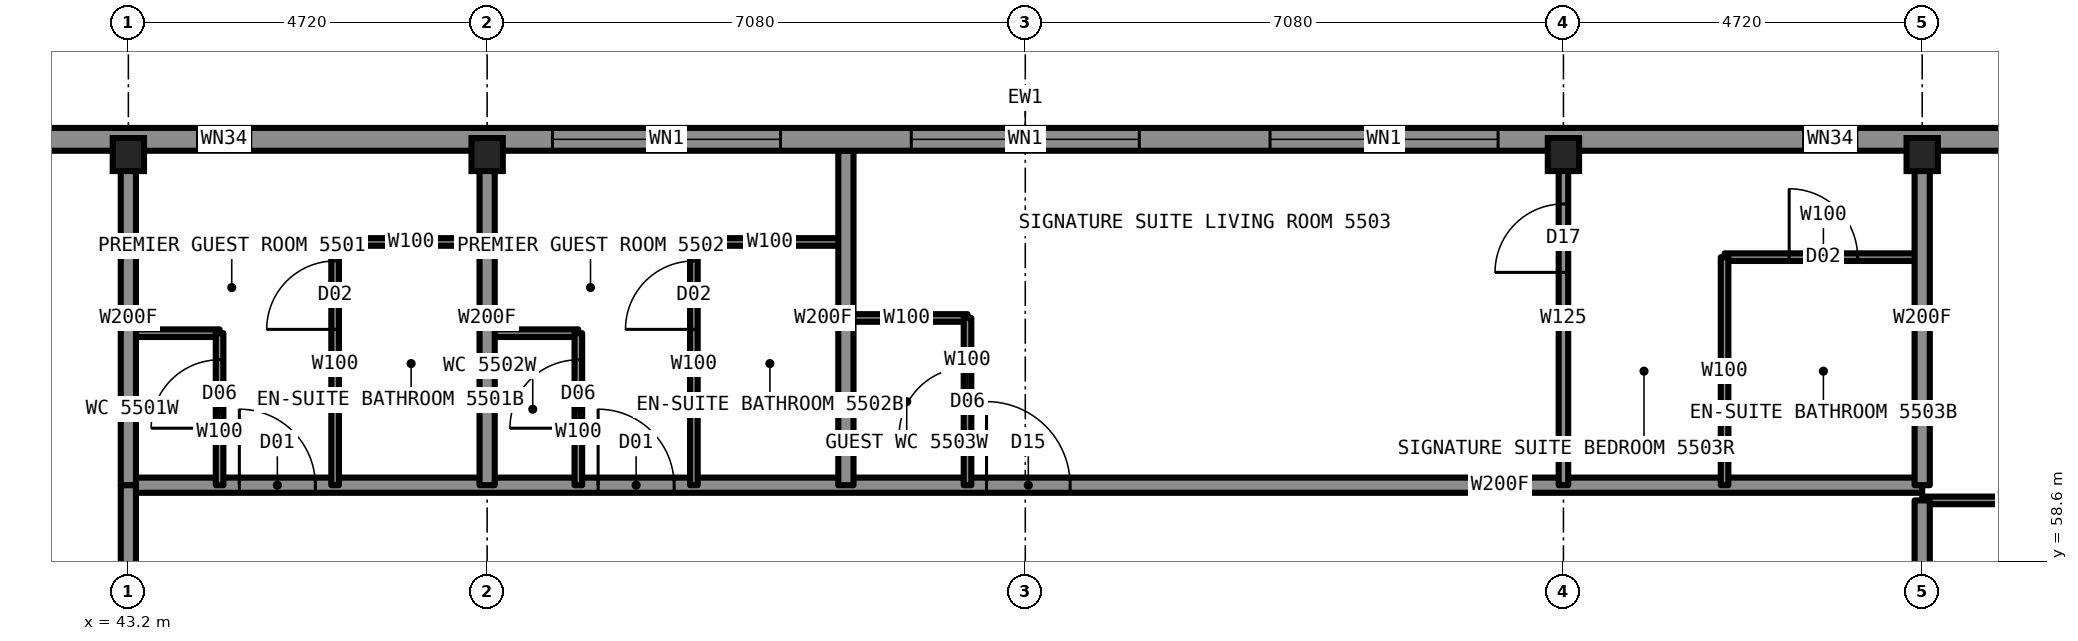
"""IFC4 building model, lengths in metres.
Left out: names, types, materials, properties, quantities, classifications, styles, units other than length and angle.
Written with IfcOpenShell. Run it as: python <this file> out.ifc"""

import sys

from ifc_helpers import new_model, si_unit, direction, frame, frame_2d, origin, origin_2d, place, context, subcontext, project, spatial, rectangle, i_section, extrude, element, fill, save


model = new_model("IFC4")
c1 = context("Model", 3, precision=1e-05, world=origin(), true_north=direction((0.0, 1.0)))
c2 = subcontext(c1, "Body", "Model", "MODEL_VIEW")
j1 = project(units=[si_unit("LENGTHUNIT", "METRE"), si_unit("PLANEANGLEUNIT", "RADIAN")], contexts=[c1])
p1 = place(None, origin())
s1 = spatial("IfcSite", under=j1, at=p1, CompositionType="ELEMENT")
p2 = place(p1, origin())
s2 = spatial("IfcBuilding", under=s1, at=p2, CompositionType="ELEMENT")
p3 = place(p2, frame((0.0, 0.0, 203.8)))
s3 = spatial("IfcBuildingStorey", under=s2, at=p3, CompositionType="ELEMENT", Elevation=203.8)
for number, where, z_axis, x_axis in (
    (1, (43.2, 63.95, 0.0), (0.0, 0.0, 1.0), (1.0, 0.0, 0.0)),
    (2, (47.92, 63.95, 0.0), (0.0, 0.0, 1.0), (1.0, 0.0, 0.0)),
    (3, (62.08, 63.95, 0.0), (0.0, 0.0, 1.0), (1.0, 0.0, 0.0)),
    (4, (66.8, 63.95, 0.0), (0.0, 0.0, 1.0), (1.0, 0.0, 0.0)),
):
    element("IfcColumn", number, at=place(p3, frame(where, z_axis=z_axis, x_axis=x_axis)), inside=s3, PredefinedType="COLUMN", context=c2, shape_type="SweptSolid", body=[
        extrude(i_section(OverallWidth=0.411, OverallDepth=0.434, WebThickness=0.036, FlangeThickness=0.057, at=origin_2d()), origin(), (0.0, 0.0, 1.0), 3.5),
    ])
p4 = place(p3, frame((66.8, 59.4, 0.0), z_axis=(0.0, 0.0, 1.0), x_axis=(1.0, 0.0, 0.0)))
e5 = element("IfcWall", 5, at=p4, inside=s3, PredefinedType="PARTITIONING", context=c2, shape_type="SweptSolid", body=[
    extrude(rectangle(XDim=2.6, YDim=0.1, at=frame_2d((1.3, 0.0))), origin(), (0.0, 0.0, 1.0), 3.33),
])
p5 = place(p3, frame((43.2, 59.6, 0.0), z_axis=(0.0, 0.0, 1.0), x_axis=(1.0, 0.0, 0.0)))
e6 = element("IfcWall", 6, at=p5, inside=s3, PredefinedType="PARTITIONING", context=c2, shape_type="SweptSolid", body=[
    extrude(rectangle(XDim=23.6, YDim=0.2, at=frame_2d((11.8, 0.0))), origin(), (0.0, 0.0, 1.0), 3.33),
])
p6 = place(p5, frame((1.46, 0.0, 0.0)))
e7 = element("IfcOpeningElement", 7, at=p6, cuts=e6, PredefinedType="OPENING", context=c2, shape_type="SweptSolid", body=[
    extrude(rectangle(XDim=1.0, YDim=2.2, at=frame_2d((0.5, 1.1))), frame((0.0, 0.11, 0.0), z_axis=(0.0, -1.0, 0.0), x_axis=(1.0, 0.0, 0.0)), (0.0, 0.0, 1.0), 0.22),
])
p7 = place(p5, frame((6.18, 0.0, 0.0)))
e8 = element("IfcOpeningElement", 8, at=p7, cuts=e6, PredefinedType="OPENING", context=c2, shape_type="SweptSolid", body=[
    extrude(rectangle(XDim=1.0, YDim=2.2, at=frame_2d((0.5, 1.1))), frame((0.0, 0.11, 0.0), z_axis=(0.0, -1.0, 0.0), x_axis=(1.0, 0.0, 0.0)), (0.0, 0.0, 1.0), 0.22),
])
p8 = place(p5, frame((11.29, 0.0, 0.0)))
e9 = element("IfcOpeningElement", 9, at=p8, cuts=e6, PredefinedType="OPENING", context=c2, shape_type="SweptSolid", body=[
    extrude(rectangle(XDim=1.1, YDim=2.2, at=frame_2d((0.55, 1.1))), frame((0.0, 0.11, 0.0), z_axis=(0.0, -1.0, 0.0), x_axis=(1.0, 0.0, 0.0)), (0.0, 0.0, 1.0), 0.22),
])
p9 = place(p3, frame((43.2, 61.6, 0.0), z_axis=(0.0, 0.0, 1.0), x_axis=(1.0, 0.0, 0.0)))
e10 = element("IfcWall", 10, at=p9, inside=s3, PredefinedType="PARTITIONING", context=c2, shape_type="SweptSolid", body=[
    extrude(rectangle(XDim=1.2, YDim=0.1, at=frame_2d((0.6, 0.0))), origin(), (0.0, 0.0, 1.0), 3.33),
])
p10 = place(p3, frame((47.92, 61.6, 0.0), z_axis=(0.0, 0.0, 1.0), x_axis=(1.0, 0.0, 0.0)))
e11 = element("IfcWall", 11, at=p10, inside=s3, PredefinedType="PARTITIONING", context=c2, shape_type="SweptSolid", body=[
    extrude(rectangle(XDim=1.2, YDim=0.1, at=frame_2d((0.6, 0.0))), origin(), (0.0, 0.0, 1.0), 3.33),
])
p11 = place(p3, frame((52.64, 61.8, 0.0), z_axis=(0.0, 0.0, 1.0), x_axis=(1.0, 0.0, 0.0)))
e12 = element("IfcWall", 12, at=p11, inside=s3, PredefinedType="PARTITIONING", context=c2, shape_type="SweptSolid", body=[
    extrude(rectangle(XDim=1.6, YDim=0.1, at=frame_2d((0.8, 0.0))), origin(), (0.0, 0.0, 1.0), 3.33),
])
p12 = place(p3, frame((64.2, 62.6, 0.0), z_axis=(0.0, 0.0, 1.0), x_axis=(1.0, 0.0, 0.0)))
e13 = element("IfcWall", 13, at=p12, inside=s3, PredefinedType="PARTITIONING", context=c2, shape_type="SweptSolid", body=[
    extrude(rectangle(XDim=2.6, YDim=0.1, at=frame_2d((1.3, 0.0))), origin(), (0.0, 0.0, 1.0), 3.33),
])
p13 = place(p12, frame((0.85, 0.0, 0.0)))
e14 = element("IfcOpeningElement", 14, at=p13, cuts=e13, PredefinedType="OPENING", context=c2, shape_type="SweptSolid", body=[
    extrude(rectangle(XDim=0.9, YDim=2.1, at=frame_2d((0.45, 1.05))), frame((0.0, 0.06, 0.0), z_axis=(0.0, -1.0, 0.0), x_axis=(1.0, 0.0, 0.0)), (0.0, 0.0, 1.0), 0.12),
])
for number, where, z_axis, x_axis in (
    (15, (45.92, 62.8, 0.0), (0.0, 0.0, 1.0), (1.0, 0.0, 0.0)),
    (16, (50.64, 62.8, 0.0), (0.0, 0.0, 1.0), (1.0, 0.0, 0.0)),
):
    element("IfcWall", number, at=place(p3, frame(where, z_axis=z_axis, x_axis=x_axis)), inside=s3, PredefinedType="PARTITIONING", context=c2, shape_type="SweptSolid", body=[
        extrude(rectangle(XDim=2.0, YDim=0.1, at=frame_2d((1.0, 0.0))), origin(), (0.0, 0.0, 1.0), 3.33),
    ])
p14 = place(p3, frame((54.24, 59.6, 0.0), z_axis=(0.0, 0.0, 1.0), x_axis=(0.0, 1.0, 0.0)))
e17 = element("IfcWall", 17, at=p14, inside=s3, PredefinedType="PARTITIONING", context=c2, shape_type="SweptSolid", body=[
    extrude(rectangle(XDim=2.2, YDim=0.1, at=frame_2d((1.1, 0.0))), origin(), (0.0, 0.0, 1.0), 3.33),
])
p15 = place(p14, frame((0.65, 0.0, 0.0)))
e18 = element("IfcOpeningElement", 18, at=p15, cuts=e17, PredefinedType="OPENING", context=c2, shape_type="SweptSolid", body=[
    extrude(rectangle(XDim=0.9, YDim=2.1, at=frame_2d((0.45, 1.05))), frame((0.0, 0.06, 0.0), z_axis=(0.0, -1.0, 0.0), x_axis=(1.0, 0.0, 0.0)), (0.0, 0.0, 1.0), 0.12),
])
p16 = place(p3, frame((44.4, 59.6, 0.0), z_axis=(0.0, 0.0, 1.0), x_axis=(0.0, 1.0, 0.0)))
e19 = element("IfcWall", 19, at=p16, inside=s3, PredefinedType="PARTITIONING", context=c2, shape_type="SweptSolid", body=[
    extrude(rectangle(XDim=2.0, YDim=0.1, at=frame_2d((1.0, 0.0))), origin(), (0.0, 0.0, 1.0), 3.33),
])
p17 = place(p16, frame((0.75, 0.0, 0.0)))
e20 = element("IfcOpeningElement", 20, at=p17, cuts=e19, PredefinedType="OPENING", context=c2, shape_type="SweptSolid", body=[
    extrude(rectangle(XDim=0.9, YDim=2.1, at=frame_2d((0.45, 1.05))), frame((0.0, 0.06, 0.0), z_axis=(0.0, -1.0, 0.0), x_axis=(1.0, 0.0, 0.0)), (0.0, 0.0, 1.0), 0.12),
])
p18 = place(p3, frame((43.2, 59.6, 0.0), z_axis=(0.0, 0.0, 1.0), x_axis=(0.0, 1.0, 0.0)))
e21 = element("IfcWall", 21, at=p18, inside=s3, PredefinedType="PARTITIONING", context=c2, shape_type="SweptSolid", body=[
    extrude(rectangle(XDim=4.4, YDim=0.2, at=frame_2d((2.2, 0.0))), origin(), (0.0, 0.0, 1.0), 2.573),
])
p19 = place(p3, frame((52.64, 59.6, 0.0), z_axis=(0.0, 0.0, 1.0), x_axis=(0.0, 1.0, 0.0)))
e22 = element("IfcWall", 22, at=p19, inside=s3, PredefinedType="PARTITIONING", context=c2, shape_type="SweptSolid", body=[
    extrude(rectangle(XDim=4.4, YDim=0.2, at=frame_2d((2.2, 0.0))), origin(), (0.0, 0.0, 1.0), 3.33),
])
p20 = place(p3, frame((50.64, 59.6, 0.0), z_axis=(0.0, 0.0, 1.0), x_axis=(0.0, 1.0, 0.0)))
e23 = element("IfcWall", 23, at=p20, inside=s3, PredefinedType="PARTITIONING", context=c2, shape_type="SweptSolid", body=[
    extrude(rectangle(XDim=3.2, YDim=0.1, at=frame_2d((1.6, 0.0))), origin(), (0.0, 0.0, 1.0), 3.33),
])
p21 = place(p20, frame((2.05, 0.0, 0.0)))
e24 = element("IfcOpeningElement", 24, at=p21, cuts=e23, PredefinedType="OPENING", context=c2, shape_type="SweptSolid", body=[
    extrude(rectangle(XDim=0.9, YDim=2.1, at=frame_2d((0.45, 1.05))), frame((0.0, 0.06, 0.0), z_axis=(0.0, -1.0, 0.0), x_axis=(1.0, 0.0, 0.0)), (0.0, 0.0, 1.0), 0.12),
])
p22 = place(p3, frame((49.12, 59.6, 0.0), z_axis=(0.0, 0.0, 1.0), x_axis=(0.0, 1.0, 0.0)))
e25 = element("IfcWall", 25, at=p22, inside=s3, PredefinedType="PARTITIONING", context=c2, shape_type="SweptSolid", body=[
    extrude(rectangle(XDim=2.0, YDim=0.1, at=frame_2d((1.0, 0.0))), origin(), (0.0, 0.0, 1.0), 3.33),
])
p23 = place(p22, frame((0.75, 0.0, 0.0)))
e26 = element("IfcOpeningElement", 26, at=p23, cuts=e25, PredefinedType="OPENING", context=c2, shape_type="SweptSolid", body=[
    extrude(rectangle(XDim=0.9, YDim=2.1, at=frame_2d((0.45, 1.05))), frame((0.0, 0.06, 0.0), z_axis=(0.0, -1.0, 0.0), x_axis=(1.0, 0.0, 0.0)), (0.0, 0.0, 1.0), 0.12),
])
p24 = place(p3, frame((47.92, 59.6, 0.0), z_axis=(0.0, 0.0, 1.0), x_axis=(0.0, 1.0, 0.0)))
e27 = element("IfcWall", 27, at=p24, inside=s3, PredefinedType="PARTITIONING", context=c2, shape_type="SweptSolid", body=[
    extrude(rectangle(XDim=4.4, YDim=0.2, at=frame_2d((2.2, 0.0))), origin(), (0.0, 0.0, 1.0), 2.573),
])
p25 = place(p3, frame((45.92, 59.6, 0.0), z_axis=(0.0, 0.0, 1.0), x_axis=(0.0, 1.0, 0.0)))
e28 = element("IfcWall", 28, at=p25, inside=s3, PredefinedType="PARTITIONING", context=c2, shape_type="SweptSolid", body=[
    extrude(rectangle(XDim=3.2, YDim=0.1, at=frame_2d((1.6, 0.0))), origin(), (0.0, 0.0, 1.0), 3.33),
])
p26 = place(p25, frame((2.05, 0.0, 0.0)))
e29 = element("IfcOpeningElement", 29, at=p26, cuts=e28, PredefinedType="OPENING", context=c2, shape_type="SweptSolid", body=[
    extrude(rectangle(XDim=0.9, YDim=2.1, at=frame_2d((0.45, 1.05))), frame((0.0, 0.06, 0.0), z_axis=(0.0, -1.0, 0.0), x_axis=(1.0, 0.0, 0.0)), (0.0, 0.0, 1.0), 0.12),
])
p27 = place(p3, frame((66.8, 59.6, 0.0), z_axis=(0.0, 0.0, 1.0), x_axis=(0.0, 1.0, 0.0)))
e30 = element("IfcWall", 30, at=p27, inside=s3, PredefinedType="PARTITIONING", context=c2, shape_type="SweptSolid", body=[
    extrude(rectangle(XDim=4.4, YDim=0.2, at=frame_2d((2.2, 0.0))), origin(), (0.0, 0.0, 1.0), 2.573),
])
p28 = place(p3, frame((62.08, 59.6, 0.0), z_axis=(0.0, 0.0, 1.0), x_axis=(0.0, 1.0, 0.0)))
e31 = element("IfcWall", 31, at=p28, inside=s3, PredefinedType="PARTITIONING", context=c2, shape_type="SweptSolid", body=[
    extrude(rectangle(XDim=4.4, YDim=0.125, at=frame_2d((2.2, 0.0))), origin(), (0.0, 0.0, 1.0), 2.573),
])
p29 = place(p28, frame((2.8, 0.0, 0.0)))
e32 = element("IfcOpeningElement", 32, at=p29, cuts=e31, PredefinedType="OPENING", context=c2, shape_type="SweptSolid", body=[
    extrude(rectangle(XDim=0.9, YDim=2.2, at=frame_2d((0.45, 1.1))), frame((0.0, 0.073, 0.0), z_axis=(0.0, -1.0, 0.0), x_axis=(1.0, 0.0, 0.0)), (0.0, 0.0, 1.0), 0.145),
])
p30 = place(p3, frame((64.2, 59.6, 0.0), z_axis=(0.0, 0.0, 1.0), x_axis=(0.0, 1.0, 0.0)))
e33 = element("IfcWall", 33, at=p30, inside=s3, PredefinedType="PARTITIONING", context=c2, shape_type="SweptSolid", body=[
    extrude(rectangle(XDim=3.0, YDim=0.1, at=frame_2d((1.5, 0.0))), origin(), (0.0, 0.0, 1.0), 3.33),
])
p31 = place(p3, frame((68.8, 64.15, 0.0), z_axis=(0.0, 0.0, 1.0), x_axis=(-1.0, 0.0, 0.0)))
e34 = element("IfcWall", 34, at=p31, inside=s3, PredefinedType="SOLIDWALL", context=c2, shape_type="SweptSolid", body=[
    extrude(rectangle(XDim=27.6, YDim=0.3, at=frame_2d((13.8, 0.0))), origin(), (0.0, 0.0, 1.0), 2.83),
])
p32 = place(p31, frame((2.86, 0.0, 0.3)))
e35 = element("IfcOpeningElement", 35, at=p32, cuts=e34, PredefinedType="OPENING", context=c2, shape_type="SweptSolid", body=[
    extrude(rectangle(XDim=0.7, YDim=1.2, at=frame_2d((0.35, 0.6))), frame((0.0, 0.16, 0.0), z_axis=(0.0, -1.0, 0.0), x_axis=(1.0, 0.0, 0.0)), (0.0, 0.0, 1.0), 0.32),
])
p33 = place(p31, frame((7.58, 0.0, 0.3)))
e36 = element("IfcOpeningElement", 36, at=p33, cuts=e34, PredefinedType="OPENING", context=c2, shape_type="SweptSolid", body=[
    extrude(rectangle(XDim=3.0, YDim=2.0, at=frame_2d((1.5, 1.0))), frame((0.0, 0.16, 0.0), z_axis=(0.0, -1.0, 0.0), x_axis=(1.0, 0.0, 0.0)), (0.0, 0.0, 1.0), 0.32),
])
p34 = place(p31, frame((12.3, 0.0, 0.3)))
e37 = element("IfcOpeningElement", 37, at=p34, cuts=e34, PredefinedType="OPENING", context=c2, shape_type="SweptSolid", body=[
    extrude(rectangle(XDim=3.0, YDim=2.0, at=frame_2d((1.5, 1.0))), frame((0.0, 0.16, 0.0), z_axis=(0.0, -1.0, 0.0), x_axis=(1.0, 0.0, 0.0)), (0.0, 0.0, 1.0), 0.32),
])
p35 = place(p31, frame((17.02, 0.0, 0.3)))
e38 = element("IfcOpeningElement", 38, at=p35, cuts=e34, PredefinedType="OPENING", context=c2, shape_type="SweptSolid", body=[
    extrude(rectangle(XDim=3.0, YDim=2.0, at=frame_2d((1.5, 1.0))), frame((0.0, 0.16, 0.0), z_axis=(0.0, -1.0, 0.0), x_axis=(1.0, 0.0, 0.0)), (0.0, 0.0, 1.0), 0.32),
])
p36 = place(p31, frame((23.99, 0.0, 0.3)))
e39 = element("IfcOpeningElement", 39, at=p36, cuts=e34, PredefinedType="OPENING", context=c2, shape_type="SweptSolid", body=[
    extrude(rectangle(XDim=0.7, YDim=1.2, at=frame_2d((0.35, 0.6))), frame((0.0, 0.16, 0.0), z_axis=(0.0, -1.0, 0.0), x_axis=(1.0, 0.0, 0.0)), (0.0, 0.0, 1.0), 0.32),
])
p37 = place(p3, frame((43.2, 56.78, 0.0), z_axis=(0.0, 0.0, 1.0), x_axis=(0.0, 1.0, 0.0)))
e40 = element("IfcWall", 40, at=p37, inside=s3, PredefinedType="PARTITIONING", context=c2, shape_type="SweptSolid", body=[
    extrude(rectangle(XDim=2.82, YDim=0.2, at=frame_2d((1.41, 0.0))), origin(), (0.0, 0.0, 1.0), 2.573),
])
p38 = place(p3, frame((66.8, 56.78, 0.0), z_axis=(0.0, 0.0, 1.0), x_axis=(0.0, 1.0, 0.0)))
e41 = element("IfcWall", 41, at=p38, inside=s3, PredefinedType="PARTITIONING", context=c2, shape_type="SweptSolid", body=[
    extrude(rectangle(XDim=2.62, YDim=0.2, at=frame_2d((1.31, 0.0))), origin(), (0.0, 0.0, 1.0), 2.573),
])
p39 = place(p6, origin())
e42 = element("IfcDoor", 42, at=p39, inside=s3, OperationType="SINGLE_SWING_LEFT", PredefinedType="DOOR", context=c2, shape_type="SweptSolid", body=[
    extrude(rectangle(XDim=1.0, YDim=2.2, at=frame_2d((0.5, 1.1))), frame((0.0, 0.025, 0.0), z_axis=(0.0, -1.0, 0.0), x_axis=(1.0, 0.0, 0.0)), (0.0, 0.0, 1.0), 0.05),
])
fill(e7, e42)
p40 = place(p26, origin())
e43 = element("IfcDoor", 43, at=p40, inside=s3, OperationType="SINGLE_SWING_RIGHT", PredefinedType="DOOR", context=c2, shape_type="SweptSolid", body=[
    extrude(rectangle(XDim=0.9, YDim=2.1, at=frame_2d((0.45, 1.05))), frame((0.0, 0.025, 0.0), z_axis=(0.0, -1.0, 0.0), x_axis=(1.0, 0.0, 0.0)), (0.0, 0.0, 1.0), 0.05),
])
fill(e29, e43)
p41 = place(p17, origin())
e44 = element("IfcDoor", 44, at=p41, inside=s3, OperationType="SINGLE_SWING_LEFT", PredefinedType="DOOR", context=c2, shape_type="SweptSolid", body=[
    extrude(rectangle(XDim=0.9, YDim=2.1, at=frame_2d((0.45, 1.05))), frame((0.0, 0.025, 0.0), z_axis=(0.0, -1.0, 0.0), x_axis=(1.0, 0.0, 0.0)), (0.0, 0.0, 1.0), 0.05),
])
fill(e20, e44)
p42 = place(p7, origin())
e45 = element("IfcDoor", 45, at=p42, inside=s3, OperationType="SINGLE_SWING_LEFT", PredefinedType="DOOR", context=c2, shape_type="SweptSolid", body=[
    extrude(rectangle(XDim=1.0, YDim=2.2, at=frame_2d((0.5, 1.1))), frame((0.0, 0.025, 0.0), z_axis=(0.0, -1.0, 0.0), x_axis=(1.0, 0.0, 0.0)), (0.0, 0.0, 1.0), 0.05),
])
fill(e8, e45)
p43 = place(p21, origin())
e46 = element("IfcDoor", 46, at=p43, inside=s3, OperationType="SINGLE_SWING_RIGHT", PredefinedType="DOOR", context=c2, shape_type="SweptSolid", body=[
    extrude(rectangle(XDim=0.9, YDim=2.1, at=frame_2d((0.45, 1.05))), frame((0.0, 0.025, 0.0), z_axis=(0.0, -1.0, 0.0), x_axis=(1.0, 0.0, 0.0)), (0.0, 0.0, 1.0), 0.05),
])
fill(e24, e46)
p44 = place(p23, origin())
e47 = element("IfcDoor", 47, at=p44, inside=s3, OperationType="SINGLE_SWING_LEFT", PredefinedType="DOOR", context=c2, shape_type="SweptSolid", body=[
    extrude(rectangle(XDim=0.9, YDim=2.1, at=frame_2d((0.45, 1.05))), frame((0.0, 0.025, 0.0), z_axis=(0.0, -1.0, 0.0), x_axis=(1.0, 0.0, 0.0)), (0.0, 0.0, 1.0), 0.05),
])
fill(e26, e47)
p45 = place(p8, origin())
e48 = element("IfcDoor", 48, at=p45, inside=s3, OperationType="SINGLE_SWING_LEFT", PredefinedType="DOOR", context=c2, shape_type="SweptSolid", body=[
    extrude(rectangle(XDim=1.1, YDim=2.2, at=frame_2d((0.55, 1.1))), frame((0.0, 0.025, 0.0), z_axis=(0.0, -1.0, 0.0), x_axis=(1.0, 0.0, 0.0)), (0.0, 0.0, 1.0), 0.05),
])
fill(e9, e48)
p46 = place(p13, origin())
e49 = element("IfcDoor", 49, at=p46, inside=s3, OperationType="SINGLE_SWING_RIGHT", PredefinedType="DOOR", context=c2, shape_type="SweptSolid", body=[
    extrude(rectangle(XDim=0.9, YDim=2.1, at=frame_2d((0.45, 1.05))), frame((0.0, 0.025, 0.0), z_axis=(0.0, -1.0, 0.0), x_axis=(1.0, 0.0, 0.0)), (0.0, 0.0, 1.0), 0.05),
])
fill(e14, e49)
p47 = place(p29, origin())
e50 = element("IfcDoor", 50, at=p47, inside=s3, OperationType="SINGLE_SWING_LEFT", PredefinedType="DOOR", context=c2, shape_type="SweptSolid", body=[
    extrude(rectangle(XDim=0.9, YDim=2.2, at=frame_2d((0.45, 1.1))), frame((0.0, 0.025, 0.0), z_axis=(0.0, -1.0, 0.0), x_axis=(1.0, 0.0, 0.0)), (0.0, 0.0, 1.0), 0.05),
])
fill(e32, e50)
p48 = place(p15, origin())
e51 = element("IfcDoor", 51, at=p48, inside=s3, OperationType="SINGLE_SWING_LEFT", PredefinedType="DOOR", context=c2, shape_type="SweptSolid", body=[
    extrude(rectangle(XDim=0.9, YDim=2.1, at=frame_2d((0.45, 1.05))), frame((0.0, 0.025, 0.0), z_axis=(0.0, -1.0, 0.0), x_axis=(1.0, 0.0, 0.0)), (0.0, 0.0, 1.0), 0.05),
])
fill(e18, e51)
p49 = place(p32, origin())
e52 = element("IfcWindow", 52, at=p49, inside=s3, PartitioningType="SINGLE_PANEL", PredefinedType="WINDOW", context=c2, shape_type="SweptSolid", body=[
    extrude(rectangle(XDim=0.7, YDim=1.2, at=frame_2d((0.35, 0.6))), frame((0.0, 0.13, 0.0), z_axis=(0.0, -1.0, 0.0), x_axis=(1.0, 0.0, 0.0)), (0.0, 0.0, 1.0), 0.06),
])
fill(e35, e52)
p50 = place(p33, origin())
e53 = element("IfcWindow", 53, at=p50, inside=s3, PartitioningType="SINGLE_PANEL", PredefinedType="WINDOW", context=c2, shape_type="SweptSolid", body=[
    extrude(rectangle(XDim=3.0, YDim=2.0, at=frame_2d((1.5, 1.0))), frame((0.0, 0.13, 0.0), z_axis=(0.0, -1.0, 0.0), x_axis=(1.0, 0.0, 0.0)), (0.0, 0.0, 1.0), 0.06),
])
fill(e36, e53)
p51 = place(p34, origin())
e54 = element("IfcWindow", 54, at=p51, inside=s3, PartitioningType="SINGLE_PANEL", PredefinedType="WINDOW", context=c2, shape_type="SweptSolid", body=[
    extrude(rectangle(XDim=3.0, YDim=2.0, at=frame_2d((1.5, 1.0))), frame((0.0, 0.13, 0.0), z_axis=(0.0, -1.0, 0.0), x_axis=(1.0, 0.0, 0.0)), (0.0, 0.0, 1.0), 0.06),
])
fill(e37, e54)
p52 = place(p35, origin())
e55 = element("IfcWindow", 55, at=p52, inside=s3, PartitioningType="SINGLE_PANEL", PredefinedType="WINDOW", context=c2, shape_type="SweptSolid", body=[
    extrude(rectangle(XDim=3.0, YDim=2.0, at=frame_2d((1.5, 1.0))), frame((0.0, 0.13, 0.0), z_axis=(0.0, -1.0, 0.0), x_axis=(1.0, 0.0, 0.0)), (0.0, 0.0, 1.0), 0.06),
])
fill(e38, e55)
p53 = place(p36, origin())
e56 = element("IfcWindow", 56, at=p53, inside=s3, PartitioningType="SINGLE_PANEL", PredefinedType="WINDOW", context=c2, shape_type="SweptSolid", body=[
    extrude(rectangle(XDim=0.7, YDim=1.2, at=frame_2d((0.35, 0.6))), frame((0.0, 0.13, 0.0), z_axis=(0.0, -1.0, 0.0), x_axis=(1.0, 0.0, 0.0)), (0.0, 0.0, 1.0), 0.06),
])
fill(e39, e56)
save(model, sys.argv[1])
